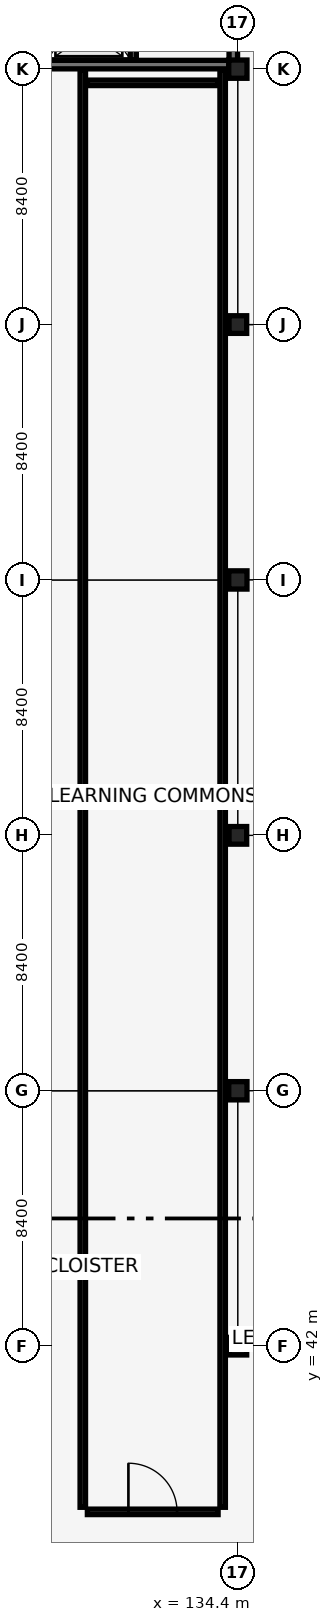
"""IFC4 building model, lengths in metres.
Left out: names, types, materials, properties, quantities, classifications, styles, units other than length and angle.
Written with IfcOpenShell. Run it as: python <this file> out.ifc"""

import sys

from ifc_helpers import new_model, si_unit, direction, frame, frame_2d, origin, origin_2d, place, context, subcontext, project, spatial, rectangle, extrude, element, fill, save


model = new_model("IFC4")
c1 = context("Model", 3, precision=1e-05, world=origin(), true_north=direction((0.0, 1.0)))
c2 = subcontext(c1, "Body", "Model", "MODEL_VIEW")
j1 = project(units=[si_unit("LENGTHUNIT", "METRE"), si_unit("PLANEANGLEUNIT", "RADIAN")], contexts=[c1])
p1 = place(None, origin())
s1 = spatial("IfcSite", under=j1, at=p1, CompositionType="ELEMENT")
p2 = place(p1, origin())
s2 = spatial("IfcBuilding", under=s1, at=p2, CompositionType="ELEMENT")
p3 = place(p2, frame((0.0, 0.0, 18.02)))
s3 = spatial("IfcBuildingStorey", under=s2, at=p3, CompositionType="ELEMENT", Elevation=18.02)
p4 = place(p3, frame((126.15, 84.15, 0.0), z_axis=(0.0, 0.0, 1.0), x_axis=(1.0, 0.0, 0.0)))
e1 = element("IfcWall", 1, at=p4, inside=s3, PredefinedType="SHEAR", context=c2, shape_type="SweptSolid", body=[
    extrude(rectangle(XDim=8.1, YDim=0.28, at=frame_2d((4.05, 0.0))), origin(), (0.0, 0.0, 1.0), 3.78),
])
p5 = place(p4, frame((0.485, 0.0, 0.0)))
e2 = element("IfcOpeningElement", 2, at=p5, cuts=e1, PredefinedType="OPENING", context=c2, shape_type="SweptSolid", body=[
    extrude(rectangle(XDim=1.0, YDim=2.15, at=frame_2d((0.5, 1.075))), frame((0.0, 0.15, 0.0), z_axis=(0.0, -1.0, 0.0), x_axis=(1.0, 0.0, 0.0)), (0.0, 0.0, 1.0), 0.3),
])
p6 = place(p3, frame((134.25, 84.15, 0.0), z_axis=(0.0, 0.0, 1.0), x_axis=(0.0, 1.0, 0.0)))
e3 = element("IfcWall", 3, at=p6, inside=s3, PredefinedType="SHEAR", context=c2, shape_type="SweptSolid", body=[
    extrude(rectangle(XDim=8.1, YDim=0.28, at=frame_2d((4.05, 0.0))), origin(), (0.0, 0.0, 1.0), 3.78),
])
p7 = place(p6, frame((1.325, 0.0, 0.0)))
e4 = element("IfcOpeningElement", 4, at=p7, cuts=e3, PredefinedType="OPENING", context=c2, shape_type="SweptSolid", body=[
    extrude(rectangle(XDim=1.45, YDim=2.15, at=frame_2d((0.725, 1.075))), frame((0.0, 0.15, 0.0), z_axis=(0.0, -1.0, 0.0), x_axis=(1.0, 0.0, 0.0)), (0.0, 0.0, 1.0), 0.3),
])
p8 = place(p3, frame((134.4, 42.0, 0.0), z_axis=(0.0, 0.0, 1.0), x_axis=(1.0, 0.0, 0.0)))
e5 = element("IfcColumn", 5, at=p8, inside=s3, PredefinedType="COLUMN", context=c2, shape_type="SweptSolid", body=[
    extrude(rectangle(XDim=0.58, YDim=0.58, at=origin_2d()), origin(), (0.0, 0.0, 1.0), 3.78),
])
p9 = place(p3, frame((134.4, 50.4, 0.0), z_axis=(0.0, 0.0, 1.0), x_axis=(1.0, 0.0, 0.0)))
e6 = element("IfcColumn", 6, at=p9, inside=s3, PredefinedType="COLUMN", context=c2, shape_type="SweptSolid", body=[
    extrude(rectangle(XDim=0.6, YDim=0.6, at=origin_2d()), origin(), (0.0, 0.0, 1.0), 3.78),
])
p10 = place(p3, frame((134.4, 58.8, 0.0), z_axis=(0.0, 0.0, 1.0), x_axis=(1.0, 0.0, 0.0)))
e7 = element("IfcColumn", 7, at=p10, inside=s3, PredefinedType="COLUMN", context=c2, shape_type="SweptSolid", body=[
    extrude(rectangle(XDim=0.58, YDim=0.58, at=origin_2d()), origin(), (0.0, 0.0, 1.0), 3.78),
])
p11 = place(p3, frame((134.4, 67.2, 0.0), z_axis=(0.0, 0.0, 1.0), x_axis=(1.0, 0.0, 0.0)))
e8 = element("IfcColumn", 8, at=p11, inside=s3, PredefinedType="COLUMN", context=c2, shape_type="SweptSolid", body=[
    extrude(rectangle(XDim=0.6, YDim=0.6, at=origin_2d()), origin(), (0.0, 0.0, 1.0), 3.78),
])
p12 = place(p3, frame((134.4, 75.6, 0.0), z_axis=(0.0, 0.0, 1.0), x_axis=(1.0, 0.0, 0.0)))
e9 = element("IfcColumn", 9, at=p12, inside=s3, PredefinedType="COLUMN", context=c2, shape_type="SweptSolid", body=[
    extrude(rectangle(XDim=0.58, YDim=0.58, at=origin_2d()), origin(), (0.0, 0.0, 1.0), 3.78),
])
p13 = place(p3, frame((134.4, 84.0, 0.0), z_axis=(0.0, 0.0, 1.0), x_axis=(1.0, 0.0, 0.0)))
e10 = element("IfcColumn", 10, at=p13, inside=s3, PredefinedType="COLUMN", context=c2, shape_type="SweptSolid", body=[
    extrude(rectangle(XDim=0.6, YDim=0.6, at=origin_2d()), origin(), (0.0, 0.0, 1.0), 3.78),
])
p14 = place(p3, frame((130.96, 84.3, 0.0), z_axis=(0.0, 0.0, 1.0), x_axis=(0.0, 1.0, 0.0)))
e11 = element("IfcWall", 11, at=p14, inside=s3, PredefinedType="SHEAR", context=c2, shape_type="SweptSolid", body=[
    extrude(rectangle(XDim=3.8, YDim=0.2, at=frame_2d((1.9, 0.0))), origin(), (0.0, 0.0, 1.0), 3.08),
])
p15 = place(p14, frame((0.375, 0.0, 0.0)))
e12 = element("IfcOpeningElement", 12, at=p15, cuts=e11, PredefinedType="OPENING", context=c2, shape_type="SweptSolid", body=[
    extrude(rectangle(XDim=1.1, YDim=2.15, at=frame_2d((0.55, 1.075))), frame((0.0, 0.11, 0.0), z_axis=(0.0, -1.0, 0.0), x_axis=(1.0, 0.0, 0.0)), (0.0, 0.0, 1.0), 0.22),
])
p16 = place(p14, frame((2.175, 0.0, 0.0)))
e13 = element("IfcOpeningElement", 13, at=p16, cuts=e11, PredefinedType="OPENING", context=c2, shape_type="SweptSolid", body=[
    extrude(rectangle(XDim=1.4, YDim=2.2, at=frame_2d((0.7, 1.1))), frame((0.0, 0.11, 0.0), z_axis=(0.0, -1.0, 0.0), x_axis=(1.0, 0.0, 0.0)), (0.0, 0.0, 1.0), 0.22),
])
p17 = place(p3, frame((129.45, 36.55, 0.0), z_axis=(0.0, 0.0, 1.0), x_axis=(1.0, 0.0, 0.0)))
e14 = element("IfcWall", 14, at=p17, inside=s3, PredefinedType="PARTITIONING", context=c2, shape_type="SweptSolid", body=[
    extrude(rectangle(XDim=4.3, YDim=0.18, at=frame_2d((2.15, 0.0))), origin(), (0.0, 0.0, 1.0), 3.78),
])
p18 = place(p17, frame((1.35, 0.0, 0.0)))
e15 = element("IfcOpeningElement", 15, at=p18, cuts=e14, PredefinedType="OPENING", context=c2, shape_type="SweptSolid", body=[
    extrude(rectangle(XDim=1.6, YDim=2.25, at=frame_2d((0.8, 1.125))), frame((0.0, 0.1, 0.0), z_axis=(0.0, -1.0, 0.0), x_axis=(1.0, 0.0, 0.0)), (0.0, 0.0, 1.0), 0.2),
])
p19 = place(p3, frame((129.45, 83.55, 0.0), z_axis=(0.0, 0.0, 1.0), x_axis=(1.0, 0.0, 0.0)))
e16 = element("IfcWall", 16, at=p19, inside=s3, PredefinedType="PARTITIONING", context=c2, shape_type="SweptSolid", body=[
    extrude(rectangle(XDim=4.3, YDim=0.18, at=frame_2d((2.15, 0.0))), origin(), (0.0, 0.0, 1.0), 3.78),
])
for number, where, z_axis, x_axis in (
    (17, (129.3, 36.7, 0.0), (0.0, 0.0, 1.0), (0.0, 1.0, 0.0)),
    (18, (133.9, 36.7, 0.0), (0.0, 0.0, 1.0), (0.0, 1.0, 0.0)),
):
    element("IfcWall", number, at=place(p3, frame(where, z_axis=z_axis, x_axis=x_axis)), inside=s3, PredefinedType="PARTITIONING", context=c2, shape_type="SweptSolid", body=[
        extrude(rectangle(XDim=47.27, YDim=0.18, at=frame_2d((23.635, 0.0))), origin(), (0.0, 0.0, 1.0), 3.08),
    ])
p20 = place(p18, origin())
e19 = element("IfcDoor", 19, at=p20, inside=s3, OperationType="DOUBLE_DOOR_SINGLE_SWING", PredefinedType="DOOR", context=c2, shape_type="SweptSolid", body=[
    extrude(rectangle(XDim=1.6, YDim=2.25, at=frame_2d((0.8, 1.125))), frame((0.0, 0.025, 0.0), z_axis=(0.0, -1.0, 0.0), x_axis=(1.0, 0.0, 0.0)), (0.0, 0.0, 1.0), 0.05),
])
fill(e15, e19)
save(model, sys.argv[1])
